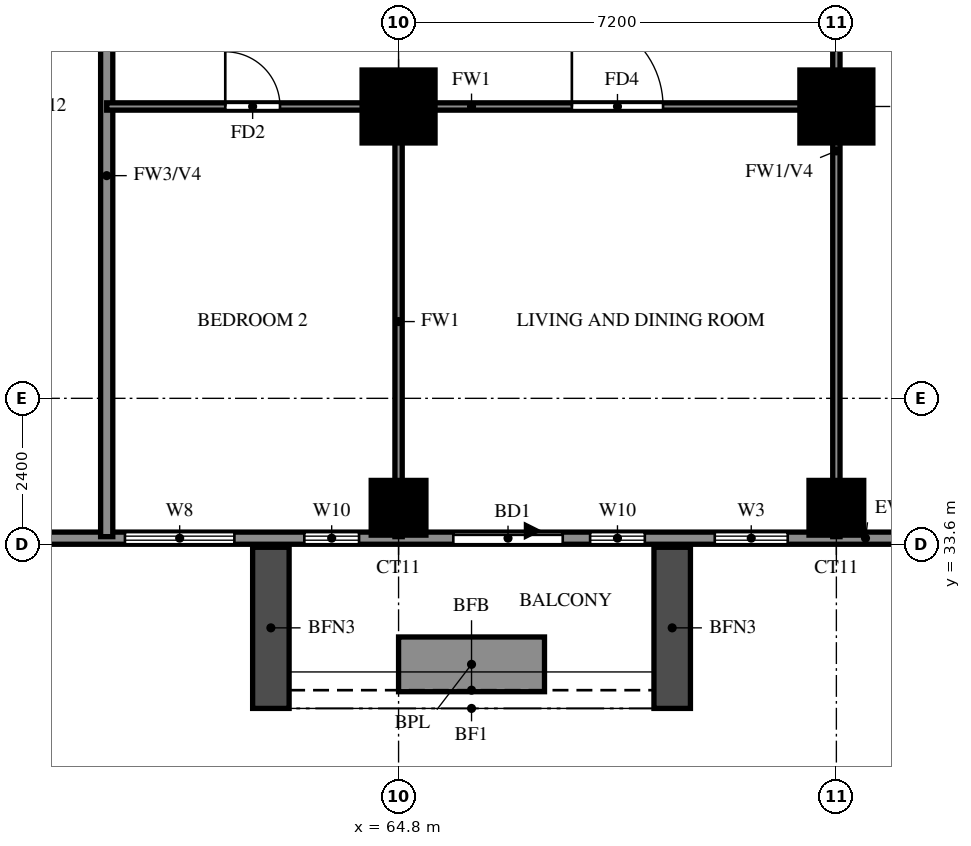
"""IFC4 building model, lengths in metres.
Left out: names, types, materials, properties, quantities, classifications, styles, units other than length and angle.
Written with IfcOpenShell. Run it as: python <this file> out.ifc"""

import sys

from ifc_helpers import new_model, si_unit, direction, frame, frame_2d, origin, origin_2d, place, context, subcontext, project, spatial, rectangle, extrude, source, transform, mapped, element, fill, save


model = new_model("IFC4")
c1 = context("Model", 3, precision=1e-05, world=origin(), true_north=direction((0.0, 1.0)))
c2 = subcontext(c1, "Body", "Model", "MODEL_VIEW")
j1 = project(units=[si_unit("LENGTHUNIT", "METRE"), si_unit("PLANEANGLEUNIT", "RADIAN")], contexts=[c1])
p1 = place(None, origin())
s1 = spatial("IfcSite", under=j1, at=p1, CompositionType="ELEMENT")
p2 = place(p1, origin())
s2 = spatial("IfcBuilding", under=s1, at=p2, CompositionType="ELEMENT")
p3 = place(p2, frame((0.0, 0.0, 97.0)))
s3 = spatial("IfcBuildingStorey", under=s2, at=p3, CompositionType="ELEMENT", Elevation=97.0)
m1 = source(origin(), c2, "Body", "SweptSolid", [
    extrude(rectangle(XDim=0.9, YDim=0.9, at=origin_2d()), origin(), (0.0, 0.0, 1.0), 3.18),
])
for number, where, z_axis, x_axis in (
    (1, (64.8, 34.2, 0.0), (0.0, 0.0, 1.0), (1.0, 0.0, 0.0)),
    (2, (72.0, 34.2, 0.0), (0.0, 0.0, 1.0), (1.0, 0.0, 0.0)),
):
    element("IfcColumn", number, at=place(p3, frame(where, z_axis=z_axis, x_axis=x_axis)), inside=s3, PredefinedType="COLUMN", context=c2, shape_type="MappedRepresentation", body=[
        mapped(m1, transform((0.0, 0.0, 0.0))),
    ])
m2 = source(origin(), c2, "Body", "SweptSolid", [
    extrude(rectangle(XDim=1.2, YDim=1.2, at=origin_2d()), origin(), (0.0, 0.0, 1.0), 3.18),
])
for number, where, z_axis, x_axis in (
    (3, (64.8, 40.8, 0.0), (0.0, 0.0, 1.0), (1.0, 0.0, 0.0)),
    (4, (72.0, 40.8, 0.0), (0.0, 0.0, 1.0), (1.0, 0.0, 0.0)),
):
    element("IfcColumn", number, at=place(p3, frame(where, z_axis=z_axis, x_axis=x_axis)), inside=s3, PredefinedType="COLUMN", context=c2, shape_type="MappedRepresentation", body=[
        mapped(m2, transform((0.0, 0.0, 0.0))),
    ])
p4 = place(p3, frame((85.996, 33.863, 0.0), z_axis=(0.0, 0.0, 1.0), x_axis=(-0.707100718496, 0.707112843825, 0.0)))
e5 = element("IfcWall", 5, at=p4, inside=s3, PredefinedType="SOLIDWALL", context=c2, shape_type="SweptSolid", body=[
    extrude(rectangle(XDim=20.135, YDim=0.2, at=frame_2d((10.067, 0.0))), origin(), (0.0, 0.0, 1.0), 3.18),
])
p5 = place(p3, frame((58.8, 33.7, 0.0), z_axis=(0.0, 0.0, 1.0), x_axis=(1.0, 0.0, 0.0)))
e6 = element("IfcWall", 6, at=p5, inside=s3, PredefinedType="SOLIDWALL", context=c2, shape_type="SweptSolid", body=[
    extrude(rectangle(XDim=27.359, YDim=0.2, at=frame_2d((13.679, 0.0))), origin(), (0.0, 0.0, 1.0), 3.18),
])
p6 = place(p5, frame((6.9, 0.0, 0.0)))
e7 = element("IfcOpeningElement", 7, at=p6, cuts=e6, PredefinedType="OPENING", context=c2, shape_type="SweptSolid", body=[
    extrude(rectangle(XDim=1.8, YDim=2.4, at=frame_2d((0.9, 1.2))), frame((0.0, 0.11, 0.0), z_axis=(0.0, -1.0, 0.0), x_axis=(1.0, 0.0, 0.0)), (0.0, 0.0, 1.0), 0.22),
])
p7 = place(p5, frame((20.7, 0.0, 0.0)))
e8 = element("IfcOpeningElement", 8, at=p7, cuts=e6, PredefinedType="OPENING", context=c2, shape_type="SweptSolid", body=[
    extrude(rectangle(XDim=1.8, YDim=2.4, at=frame_2d((0.9, 1.2))), frame((0.0, 0.11, 0.0), z_axis=(0.0, -1.0, 0.0), x_axis=(1.0, 0.0, 0.0)), (0.0, 0.0, 1.0), 0.22),
])
p8 = place(p5, frame((9.15, 0.0, 0.6)))
e9 = element("IfcOpeningElement", 9, at=p8, cuts=e6, PredefinedType="OPENING", context=c2, shape_type="SweptSolid", body=[
    extrude(rectangle(XDim=0.9, YDim=2.4, at=frame_2d((0.45, 1.2))), frame((0.0, 0.11, 0.0), z_axis=(0.0, -1.0, 0.0), x_axis=(1.0, 0.0, 0.0)), (0.0, 0.0, 1.0), 0.22),
])
p9 = place(p5, frame((11.2, 0.0, 0.6)))
e10 = element("IfcOpeningElement", 10, at=p9, cuts=e6, PredefinedType="OPENING", context=c2, shape_type="SweptSolid", body=[
    extrude(rectangle(XDim=1.2, YDim=2.4, at=frame_2d((0.6, 1.2))), frame((0.0, 0.11, 0.0), z_axis=(0.0, -1.0, 0.0), x_axis=(1.0, 0.0, 0.0)), (0.0, 0.0, 1.0), 0.22),
])
p10 = place(p5, frame((1.5, 0.0, 0.6)))
e11 = element("IfcOpeningElement", 11, at=p10, cuts=e6, PredefinedType="OPENING", context=c2, shape_type="SweptSolid", body=[
    extrude(rectangle(XDim=1.8, YDim=2.4, at=frame_2d((0.9, 1.2))), frame((0.0, 0.11, 0.0), z_axis=(0.0, -1.0, 0.0), x_axis=(1.0, 0.0, 0.0)), (0.0, 0.0, 1.0), 0.22),
])
p11 = place(p5, frame((4.45, 0.0, 0.6)))
e12 = element("IfcOpeningElement", 12, at=p11, cuts=e6, PredefinedType="OPENING", context=c2, shape_type="SweptSolid", body=[
    extrude(rectangle(XDim=0.9, YDim=2.4, at=frame_2d((0.45, 1.2))), frame((0.0, 0.11, 0.0), z_axis=(0.0, -1.0, 0.0), x_axis=(1.0, 0.0, 0.0)), (0.0, 0.0, 1.0), 0.22),
])
p12 = place(p5, frame((14.6, 0.0, 0.6)))
e13 = element("IfcOpeningElement", 13, at=p12, cuts=e6, PredefinedType="OPENING", context=c2, shape_type="SweptSolid", body=[
    extrude(rectangle(XDim=2.4, YDim=2.4, at=frame_2d((1.2, 1.2))), frame((0.0, 0.11, 0.0), z_axis=(0.0, -1.0, 0.0), x_axis=(1.0, 0.0, 0.0)), (0.0, 0.0, 1.0), 0.22),
])
p13 = place(p5, frame((18.9, 0.0, 0.6)))
e14 = element("IfcOpeningElement", 14, at=p13, cuts=e6, PredefinedType="OPENING", context=c2, shape_type="SweptSolid", body=[
    extrude(rectangle(XDim=1.2, YDim=2.4, at=frame_2d((0.6, 1.2))), frame((0.0, 0.11, 0.0), z_axis=(0.0, -1.0, 0.0), x_axis=(1.0, 0.0, 0.0)), (0.0, 0.0, 1.0), 0.22),
])
p14 = place(p5, frame((23.1, 0.0, 0.6)))
e15 = element("IfcOpeningElement", 15, at=p14, cuts=e6, PredefinedType="OPENING", context=c2, shape_type="SweptSolid", body=[
    extrude(rectangle(XDim=1.2, YDim=2.4, at=frame_2d((0.6, 1.2))), frame((0.0, 0.11, 0.0), z_axis=(0.0, -1.0, 0.0), x_axis=(1.0, 0.0, 0.0)), (0.0, 0.0, 1.0), 0.22),
])
p15 = place(p5, frame((25.579, 0.0, 0.6)))
e16 = element("IfcOpeningElement", 16, at=p15, cuts=e6, PredefinedType="OPENING", context=c2, shape_type="SweptSolid", body=[
    extrude(rectangle(XDim=1.2, YDim=2.4, at=frame_2d((0.6, 1.2))), frame((0.0, 0.11, 0.0), z_axis=(0.0, -1.0, 0.0), x_axis=(1.0, 0.0, 0.0)), (0.0, 0.0, 1.0), 0.22),
])
for number, where, z_axis, x_axis in (
    (17, (62.7, 33.55, 0.0), (0.0, 0.0, 1.0), (0.0, -1.0, 0.0)),
    (18, (69.3, 33.55, 0.0), (0.0, 0.0, 1.0), (0.0, -1.0, 0.0)),
):
    element("IfcWall", number, at=place(p3, frame(where, z_axis=z_axis, x_axis=x_axis)), inside=s3, PredefinedType="SOLIDWALL", context=c2, shape_type="SweptSolid", body=[
        extrude(rectangle(XDim=2.65, YDim=0.6, at=frame_2d((1.325, 0.0))), origin(), (0.0, 0.0, 1.0), 2.85),
    ])
p16 = place(p3, frame((64.8, 31.625, 0.0), z_axis=(0.0, 0.0, 1.0), x_axis=(1.0, 0.0, 0.0)))
e19 = element("IfcWall", 19, at=p16, inside=s3, PredefinedType="SOLIDWALL", context=c2, shape_type="SweptSolid", body=[
    extrude(rectangle(XDim=2.4, YDim=0.9, at=frame_2d((1.2, 0.0))), origin(), (0.0, 0.0, 1.0), 0.9),
])
p17 = place(p3, frame((60.0, 33.725, 0.0), z_axis=(0.0, 0.0, 1.0), x_axis=(0.0, 1.0, 0.0)))
e20 = element("IfcWall", 20, at=p17, inside=s3, PredefinedType="SOLIDWALL", context=c2, shape_type="SweptSolid", body=[
    extrude(rectangle(XDim=11.875, YDim=0.2, at=frame_2d((5.938, 0.0))), origin(), (0.0, 0.0, 1.0), 2.28),
])
p18 = place(p3, frame((60.0, 40.8, 0.0), z_axis=(0.0, 0.0, 1.0), x_axis=(1.0, 0.0, 0.0)))
e21 = element("IfcWall", 21, at=p18, inside=s3, PredefinedType="PARTITIONING", context=c2, shape_type="SweptSolid", body=[
    extrude(rectangle(XDim=12.0, YDim=0.12, at=frame_2d((6.0, 0.0))), origin(), (0.0, 0.0, 1.0), 3.18),
])
p19 = place(p18, frame((7.65, 0.0, 0.0)))
e22 = element("IfcOpeningElement", 22, at=p19, cuts=e21, PredefinedType="OPENING", context=c2, shape_type="SweptSolid", body=[
    extrude(rectangle(XDim=1.5, YDim=2.1, at=frame_2d((0.75, 1.05))), frame((0.0, 0.07, 0.0), z_axis=(0.0, -1.0, 0.0), x_axis=(1.0, 0.0, 0.0)), (0.0, 0.0, 1.0), 0.14),
])
p20 = place(p18, frame((1.95, 0.0, 0.0)))
e23 = element("IfcOpeningElement", 23, at=p20, cuts=e21, PredefinedType="OPENING", context=c2, shape_type="SweptSolid", body=[
    extrude(rectangle(XDim=0.9, YDim=2.1, at=frame_2d((0.45, 1.05))), frame((0.0, 0.07, 0.0), z_axis=(0.0, -1.0, 0.0), x_axis=(1.0, 0.0, 0.0)), (0.0, 0.0, 1.0), 0.14),
])
p21 = place(p3, frame((64.8, 33.725, 0.0), z_axis=(0.0, 0.0, 1.0), x_axis=(0.0, 1.0, 0.0)))
e24 = element("IfcWall", 24, at=p21, inside=s3, PredefinedType="PARTITIONING", context=c2, shape_type="SweptSolid", body=[
    extrude(rectangle(XDim=7.075, YDim=0.12, at=frame_2d((3.538, 0.0))), origin(), (0.0, 0.0, 1.0), 3.18),
])
p22 = place(p3, frame((72.0, 33.725, 0.0), z_axis=(0.0, 0.0, 1.0), x_axis=(0.0, 1.0, 0.0)))
e25 = element("IfcWall", 25, at=p22, inside=s3, PredefinedType="PARTITIONING", context=c2, shape_type="SweptSolid", body=[
    extrude(rectangle(XDim=14.098, YDim=0.12, at=frame_2d((7.049, 0.0))), origin(), (0.0, 0.0, 1.0), 2.28),
])
p23 = place(p22, frame((10.075, 0.0, 0.0)))
e26 = element("IfcOpeningElement", 26, at=p23, cuts=e25, PredefinedType="OPENING", context=c2, shape_type="SweptSolid", body=[
    extrude(rectangle(XDim=0.9, YDim=2.1, at=frame_2d((0.45, 1.05))), frame((0.0, 0.07, 0.0), z_axis=(0.0, -1.0, 0.0), x_axis=(1.0, 0.0, 0.0)), (0.0, 0.0, 1.0), 0.14),
])
p24 = place(p6, origin())
e27 = element("IfcDoor", 27, at=p24, inside=s3, OperationType="DOUBLE_DOOR_SLIDING", PredefinedType="DOOR", context=c2, shape_type="SweptSolid", body=[
    extrude(rectangle(XDim=1.8, YDim=2.4, at=frame_2d((0.9, 1.2))), frame((0.0, 0.025, 0.0), z_axis=(0.0, -1.0, 0.0), x_axis=(1.0, 0.0, 0.0)), (0.0, 0.0, 1.0), 0.05),
])
fill(e7, e27)
p25 = place(p8, origin())
e28 = element("IfcWindow", 28, at=p25, inside=s3, PartitioningType="SINGLE_PANEL", PredefinedType="WINDOW", context=c2, shape_type="SweptSolid", body=[
    extrude(rectangle(XDim=0.9, YDim=2.4, at=frame_2d((0.45, 1.2))), frame((0.0, 0.03, 0.0), z_axis=(0.0, -1.0, 0.0), x_axis=(1.0, 0.0, 0.0)), (0.0, 0.0, 1.0), 0.06),
])
fill(e9, e28)
p26 = place(p9, origin())
e29 = element("IfcWindow", 29, at=p26, inside=s3, PartitioningType="SINGLE_PANEL", PredefinedType="WINDOW", context=c2, shape_type="SweptSolid", body=[
    extrude(rectangle(XDim=1.2, YDim=2.4, at=frame_2d((0.6, 1.2))), frame((0.0, 0.03, 0.0), z_axis=(0.0, -1.0, 0.0), x_axis=(1.0, 0.0, 0.0)), (0.0, 0.0, 1.0), 0.06),
])
fill(e10, e29)
p27 = place(p10, origin())
e30 = element("IfcWindow", 30, at=p27, inside=s3, PartitioningType="DOUBLE_PANEL_VERTICAL", PredefinedType="WINDOW", context=c2, shape_type="SweptSolid", body=[
    extrude(rectangle(XDim=1.8, YDim=2.4, at=frame_2d((0.9, 1.2))), frame((0.0, 0.03, 0.0), z_axis=(0.0, -1.0, 0.0), x_axis=(1.0, 0.0, 0.0)), (0.0, 0.0, 1.0), 0.06),
])
fill(e11, e30)
p28 = place(p11, origin())
e31 = element("IfcWindow", 31, at=p28, inside=s3, PartitioningType="SINGLE_PANEL", PredefinedType="WINDOW", context=c2, shape_type="SweptSolid", body=[
    extrude(rectangle(XDim=0.9, YDim=2.4, at=frame_2d((0.45, 1.2))), frame((0.0, 0.03, 0.0), z_axis=(0.0, -1.0, 0.0), x_axis=(1.0, 0.0, 0.0)), (0.0, 0.0, 1.0), 0.06),
])
fill(e12, e31)
p29 = place(p19, origin())
e32 = element("IfcDoor", 32, at=p29, inside=s3, OperationType="SINGLE_SWING_LEFT", PredefinedType="DOOR", context=c2, shape_type="SweptSolid", body=[
    extrude(rectangle(XDim=1.5, YDim=2.1, at=frame_2d((0.75, 1.05))), frame((0.0, 0.025, 0.0), z_axis=(0.0, -1.0, 0.0), x_axis=(1.0, 0.0, 0.0)), (0.0, 0.0, 1.0), 0.05),
])
fill(e22, e32)
p30 = place(p20, origin())
e33 = element("IfcDoor", 33, at=p30, inside=s3, OperationType="SINGLE_SWING_LEFT", PredefinedType="DOOR", context=c2, shape_type="SweptSolid", body=[
    extrude(rectangle(XDim=0.9, YDim=2.1, at=frame_2d((0.45, 1.05))), frame((0.0, 0.025, 0.0), z_axis=(0.0, -1.0, 0.0), x_axis=(1.0, 0.0, 0.0)), (0.0, 0.0, 1.0), 0.05),
])
fill(e23, e33)
save(model, sys.argv[1])
